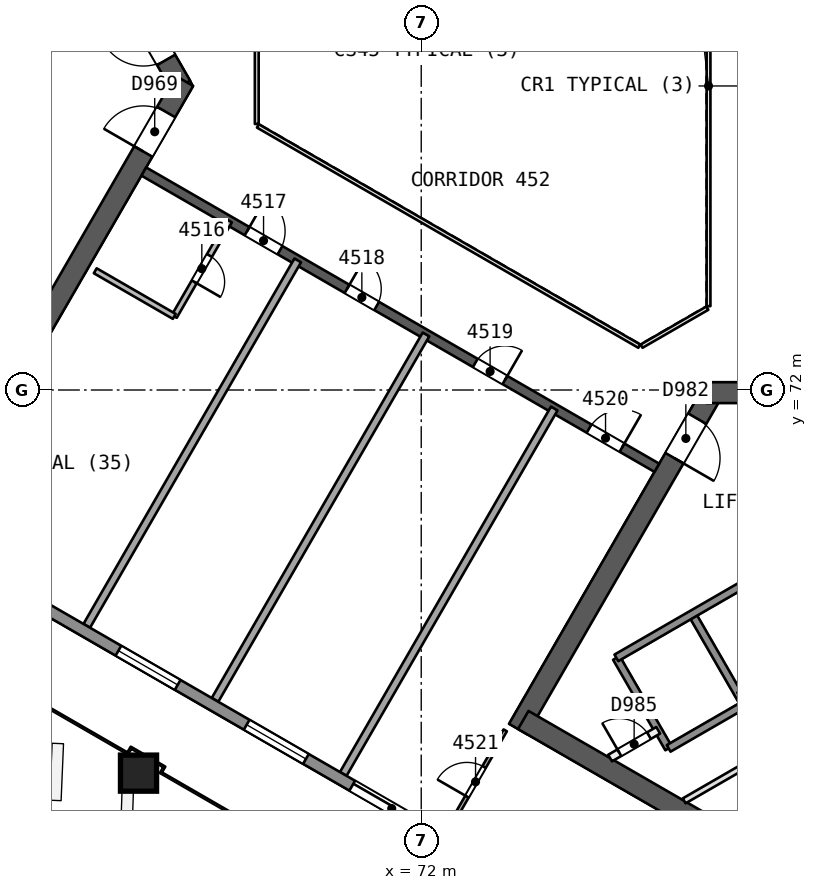
"""IFC4 building model, lengths in metres.
Left out: names, types, materials, properties, quantities, classifications, styles, units other than length and angle.
Written with IfcOpenShell. Run it as: python <this file> out.ifc"""

import sys

from ifc_helpers import new_model, si_unit, direction, frame, frame_2d, origin, origin_2d, place, context, subcontext, project, spatial, rectangle, extrude, element, fill, save


model = new_model("IFC4")
c1 = context("Model", 3, precision=1e-05, world=origin(), true_north=direction((0.0, 1.0)))
c2 = subcontext(c1, "Body", "Model", "MODEL_VIEW")
j1 = project(units=[si_unit("LENGTHUNIT", "METRE"), si_unit("PLANEANGLEUNIT", "RADIAN")], contexts=[c1])
p1 = place(None, origin())
s1 = spatial("IfcSite", under=j1, at=p1, CompositionType="ELEMENT")
p2 = place(p1, origin())
s2 = spatial("IfcBuilding", under=s1, at=p2, CompositionType="ELEMENT")
p3 = place(p2, frame((0.0, 0.0, 185.9)))
s3 = spatial("IfcBuildingStorey", under=s2, at=p3, CompositionType="ELEMENT", Elevation=185.9)
p4 = place(p3, frame((65.682, 80.0, 0.0), z_axis=(0.0, 0.0, 1.0), x_axis=(-0.500000202252, 0.866025287014, 0.0)))
e1 = element("IfcWall", 1, at=p4, inside=s3, PredefinedType="SHEAR", context=c2, shape_type="SweptSolid", body=[
    extrude(rectangle(XDim=10.221, YDim=0.55, at=frame_2d((5.111, 0.0))), origin(), (0.0, 0.0, 1.0), 3.7),
])
p5 = place(p4, frame((0.791, 0.0, 0.0)))
e2 = element("IfcOpeningElement", 2, at=p5, cuts=e1, PredefinedType="OPENING", context=c2, shape_type="SweptSolid", body=[
    extrude(rectangle(XDim=1.2, YDim=2.1, at=frame_2d((0.6, 1.05))), frame((0.0, 0.286, 0.0), z_axis=(0.0, -1.0, 0.0), x_axis=(1.0, 0.0, 0.0)), (0.0, 0.0, 1.0), 0.571),
])
p6 = place(p3, frame((60.709, 71.386, 0.0), z_axis=(0.0, 0.0, 1.0), x_axis=(0.500015938302, 0.866016201606, 0.0)))
e3 = element("IfcWall", 3, at=p6, inside=s3, PredefinedType="SHEAR", context=c2, shape_type="SweptSolid", body=[
    extrude(rectangle(XDim=10.105, YDim=0.55, at=frame_2d((5.053, 0.0))), origin(), (0.0, 0.0, 1.0), 3.7),
])
p7 = place(p6, frame((7.955, 0.0, 0.0)))
e4 = element("IfcOpeningElement", 4, at=p7, cuts=e3, PredefinedType="OPENING", context=c2, shape_type="SweptSolid", body=[
    extrude(rectangle(XDim=1.2, YDim=2.1, at=frame_2d((0.6, 1.05))), frame((0.0, 0.286, 0.0), z_axis=(0.0, -1.0, 0.0), x_axis=(1.0, 0.0, 0.0)), (0.0, 0.0, 1.0), 0.571),
])
p8 = place(p3, frame((79.659, 71.931, 0.0), z_axis=(0.0, 0.0, 1.0), x_axis=(-0.500000202252, -0.866025287014, 0.0)))
e5 = element("IfcWall", 5, at=p8, inside=s3, PredefinedType="SHEAR", context=c2, shape_type="SweptSolid", body=[
    extrude(rectangle(XDim=10.221, YDim=0.55, at=frame_2d((5.111, 0.0))), origin(), (0.0, 0.0, 1.0), 3.7),
])
p9 = place(p8, frame((0.791, 0.0, 0.0)))
e6 = element("IfcOpeningElement", 6, at=p9, cuts=e5, PredefinedType="OPENING", context=c2, shape_type="SweptSolid", body=[
    extrude(rectangle(XDim=1.2, YDim=2.1, at=frame_2d((0.6, 1.05))), frame((0.0, 0.286, 0.0), z_axis=(0.0, -1.0, 0.0), x_axis=(1.0, 0.0, 0.0)), (0.0, 0.0, 1.0), 0.571),
])
p10 = place(p3, frame((74.686, 63.317, 0.0), z_axis=(0.0, 0.0, 1.0), x_axis=(0.866024505738, -0.500001555459, 0.0)))
e7 = element("IfcWall", 7, at=p10, inside=s3, PredefinedType="SHEAR", context=c2, shape_type="SweptSolid", body=[
    extrude(rectangle(XDim=14.059, YDim=0.55, at=frame_2d((7.029, 0.0))), origin(), (0.0, 0.0, 1.0), 3.7),
])
p11 = place(p3, frame((89.605, 71.931, 0.0), z_axis=(0.0, 0.0, 1.0), x_axis=(-1.0, 0.0, 0.0)))
e8 = element("IfcWall", 8, at=p11, inside=s3, PredefinedType="SHEAR", context=c2, shape_type="SweptSolid", body=[
    extrude(rectangle(XDim=10.105, YDim=0.55, at=frame_2d((5.052, 0.0))), origin(), (0.0, 0.0, 1.0), 3.7),
])
p12 = place(p11, frame((7.955, 0.0, 0.0)))
e9 = element("IfcOpeningElement", 9, at=p12, cuts=e8, PredefinedType="OPENING", context=c2, shape_type="SweptSolid", body=[
    extrude(rectangle(XDim=1.2, YDim=2.1, at=frame_2d((0.6, 1.05))), frame((0.0, 0.286, 0.0), z_axis=(0.0, -1.0, 0.0), x_axis=(1.0, 0.0, 0.0)), (0.0, 0.0, 1.0), 0.571),
])
p13 = place(p3, frame((64.7, 77.748, 0.0), z_axis=(0.0, 0.0, 1.0), x_axis=(0.866026492143, -0.499998114903, 0.0)))
e10 = element("IfcWall", 10, at=p13, inside=s3, PredefinedType="SHEAR", context=c2, shape_type="SweptSolid", body=[
    extrude(rectangle(XDim=15.588, YDim=0.25, at=frame_2d((7.794, 0.0))), origin(), (0.0, 0.0, 1.0), 3.25),
])
p14 = place(p13, frame((3.138, 0.0, 0.0)))
e11 = element("IfcOpeningElement", 11, at=p14, cuts=e10, PredefinedType="OPENING", context=c2, shape_type="SweptSolid", body=[
    extrude(rectangle(XDim=1.0, YDim=2.1, at=frame_2d((0.5, 1.05))), frame((0.0, 0.135, 0.0), z_axis=(0.0, -1.0, 0.0), x_axis=(1.0, 0.0, 0.0)), (0.0, 0.0, 1.0), 0.271),
])
p15 = place(p13, frame((6.175, 0.0, 0.0)))
e12 = element("IfcOpeningElement", 12, at=p15, cuts=e10, PredefinedType="OPENING", context=c2, shape_type="SweptSolid", body=[
    extrude(rectangle(XDim=0.9, YDim=2.1, at=frame_2d((0.45, 1.05))), frame((0.0, 0.135, 0.0), z_axis=(0.0, -1.0, 0.0), x_axis=(1.0, 0.0, 0.0)), (0.0, 0.0, 1.0), 0.271),
])
p16 = place(p13, frame((10.072, 0.0, 0.0)))
e13 = element("IfcOpeningElement", 13, at=p16, cuts=e10, PredefinedType="OPENING", context=c2, shape_type="SweptSolid", body=[
    extrude(rectangle(XDim=0.9, YDim=2.1, at=frame_2d((0.45, 1.05))), frame((0.0, 0.135, 0.0), z_axis=(0.0, -1.0, 0.0), x_axis=(1.0, 0.0, 0.0)), (0.0, 0.0, 1.0), 0.271),
])
p17 = place(p13, frame((13.53, 0.0, 0.0)))
e14 = element("IfcOpeningElement", 14, at=p17, cuts=e10, PredefinedType="OPENING", context=c2, shape_type="SweptSolid", body=[
    extrude(rectangle(XDim=1.0, YDim=2.1, at=frame_2d((0.5, 1.05))), frame((0.0, 0.135, 0.0), z_axis=(0.0, -1.0, 0.0), x_axis=(1.0, 0.0, 0.0)), (0.0, 0.0, 1.0), 0.271),
])
p18 = place(p3, frame((64.549, 61.898, 0.0), z_axis=(0.010092954999, 0.017481261926, 0.999796248113), x_axis=(-0.866025993948, 0.499998977805, 1.48321e-07)))
e15 = element("IfcColumn", 15, at=p18, inside=s3, PredefinedType="COLUMN", context=c2, shape_type="SweptSolid", body=[
    extrude(rectangle(XDim=0.95, YDim=0.95, at=origin_2d()), origin(), (0.0, 0.0, 1.0), 3.701),
])
p19 = place(p3, frame((66.952, 76.448, 0.0), z_axis=(0.0, 0.0, 1.0), x_axis=(-0.499987231761, -0.866032775405, 0.0)))
e16 = element("IfcWall", 16, at=p19, inside=s3, PredefinedType="PARTITIONING", context=c2, shape_type="SweptSolid", body=[
    extrude(rectangle(XDim=2.9, YDim=0.15, at=frame_2d((1.45, 0.0))), origin(), (0.0, 0.0, 1.0), 3.25),
])
p20 = place(p19, frame((1.05, 0.0, 0.0)))
e17 = element("IfcOpeningElement", 17, at=p20, cuts=e16, PredefinedType="OPENING", context=c2, shape_type="SweptSolid", body=[
    extrude(rectangle(XDim=0.8, YDim=2.1, at=frame_2d((0.4, 1.05))), frame((0.0, 0.085, 0.0), z_axis=(0.0, -1.0, 0.0), x_axis=(1.0, 0.0, 0.0)), (0.0, 0.0, 1.0), 0.171),
])
p21 = place(p3, frame((65.502, 73.937, 0.0), z_axis=(0.0, 0.0, 1.0), x_axis=(-0.865994240961, 0.500053971709, 0.0)))
e18 = element("IfcWall", 18, at=p21, inside=s3, PredefinedType="PARTITIONING", context=c2, shape_type="SweptSolid", body=[
    extrude(rectangle(XDim=2.401, YDim=0.15, at=frame_2d((1.201, 0.0))), origin(), (0.0, 0.0, 1.0), 3.25),
])
for number, where, z_axis, x_axis in (
    (19, (63.198, 65.794, 0.0), (0.0, 0.0, 1.0), (0.5, 0.866, 0.0)),
    (20, (66.573, 63.845, 0.0), (0.0, 0.0, 1.0), (0.5, 0.866, 0.0)),
    (21, (69.948, 61.897, 0.0), (0.0, 0.0, 1.0), (0.5, 0.866, 0.0)),
):
    element("IfcWall", number, at=place(p3, frame(where, z_axis=z_axis, x_axis=x_axis)), inside=s3, PredefinedType="PARTITIONING", context=c2, shape_type="SweptSolid", body=[
        extrude(rectangle(XDim=11.104, YDim=0.2, at=frame_2d((5.552, 0.0))), origin(), (0.0, 0.0, 1.0), 3.25),
    ])
p22 = place(p3, frame((72.648, 60.338, 0.0), z_axis=(0.0, 0.0, 1.0), x_axis=(0.4999794672, 0.866037258078, 0.0)))
e22 = element("IfcWall", 22, at=p22, inside=s3, PredefinedType="PARTITIONING", context=c2, shape_type="SweptSolid", body=[
    extrude(rectangle(XDim=3.125, YDim=0.1, at=frame_2d((1.562, 0.0))), origin(), (0.0, 0.0, 1.0), 3.25),
])
p23 = place(p22, frame((1.112, 0.0, 0.0)))
e23 = element("IfcOpeningElement", 23, at=p23, cuts=e22, PredefinedType="OPENING", context=c2, shape_type="SweptSolid", body=[
    extrude(rectangle(XDim=0.9, YDim=2.1, at=frame_2d((0.45, 1.05))), frame((0.0, 0.061, 0.0), z_axis=(0.0, -1.0, 0.0), x_axis=(1.0, 0.0, 0.0)), (0.0, 0.0, 1.0), 0.121),
])
p24 = place(p3, frame((88.677, 50.912, 0.0), z_axis=(0.0, 0.0, 1.0), x_axis=(-0.866024890781, 0.500000888547, 0.0)))
e24 = element("IfcWall", 24, at=p24, inside=s3, PredefinedType="SOLIDWALL", context=c2, shape_type="SweptSolid", body=[
    extrude(rectangle(XDim=52.776, YDim=0.3, at=frame_2d((26.388, 0.0))), origin(), (0.0, 0.0, 1.0), 3.25),
])
p25 = place(p24, frame((18.953, 0.0, 0.0)))
e25 = element("IfcOpeningElement", 25, at=p25, cuts=e24, PredefinedType="OPENING", context=c2, shape_type="SweptSolid", body=[
    extrude(rectangle(XDim=2.4, YDim=2.4, at=frame_2d((1.2, 1.2))), frame((0.0, 0.161, 0.0), z_axis=(0.0, -1.0, 0.0), x_axis=(1.0, 0.0, 0.0)), (0.0, 0.0, 1.0), 0.321),
])
p26 = place(p24, frame((9.385, 0.0, 0.0)))
e26 = element("IfcOpeningElement", 26, at=p26, cuts=e24, PredefinedType="OPENING", context=c2, shape_type="SweptSolid", body=[
    extrude(rectangle(XDim=2.4, YDim=2.4, at=frame_2d((1.2, 1.2))), frame((0.0, 0.161, 0.0), z_axis=(0.0, -1.0, 0.0), x_axis=(1.0, 0.0, 0.0)), (0.0, 0.0, 1.0), 0.321),
])
p27 = place(p24, frame((39.984, 0.0, 0.0)))
e27 = element("IfcOpeningElement", 27, at=p27, cuts=e24, PredefinedType="OPENING", context=c2, shape_type="SweptSolid", body=[
    extrude(rectangle(XDim=2.4, YDim=2.4, at=frame_2d((1.2, 1.2))), frame((0.0, 0.161, 0.0), z_axis=(0.0, -1.0, 0.0), x_axis=(1.0, 0.0, 0.0)), (0.0, 0.0, 1.0), 0.321),
])
p28 = place(p24, frame((26.657, 0.0, 0.9)))
e28 = element("IfcOpeningElement", 28, at=p28, cuts=e24, PredefinedType="OPENING", context=c2, shape_type="SweptSolid", body=[
    extrude(rectangle(XDim=1.8, YDim=1.5, at=frame_2d((0.9, 0.75))), frame((0.0, 0.161, 0.0), z_axis=(0.0, -1.0, 0.0), x_axis=(1.0, 0.0, 0.0)), (0.0, 0.0, 1.0), 0.321),
])
p29 = place(p24, frame((22.76, 0.0, 0.9)))
e29 = element("IfcOpeningElement", 29, at=p29, cuts=e24, PredefinedType="OPENING", context=c2, shape_type="SweptSolid", body=[
    extrude(rectangle(XDim=1.8, YDim=1.5, at=frame_2d((0.9, 0.75))), frame((0.0, 0.161, 0.0), z_axis=(0.0, -1.0, 0.0), x_axis=(1.0, 0.0, 0.0)), (0.0, 0.0, 1.0), 0.321),
])
for number, where, z_axis, x_axis in (
    (30, (77.135, 64.952, 0.0), (0.0, 0.0, 1.0), (0.5, -0.866, 0.0)),
    (31, (79.127, 66.102, 0.0), (0.0, 0.0, 1.0), (0.5, -0.866, 0.0)),
):
    element("IfcWall", number, at=place(p3, frame(where, z_axis=z_axis, x_axis=x_axis)), inside=s3, PredefinedType="SOLIDWALL", context=c2, shape_type="SweptSolid", body=[
        extrude(rectangle(XDim=2.75, YDim=0.2, at=frame_2d((1.375, 0.0))), origin(), (0.0, 0.0, 1.0), 3.25),
    ])
p30 = place(p3, frame((77.135, 64.952, 0.0), z_axis=(0.0, 0.0, 1.0), x_axis=(0.866031916153, 0.499988720078, 0.0)))
e32 = element("IfcWall", 32, at=p30, inside=s3, PredefinedType="SOLIDWALL", context=c2, shape_type="SweptSolid", body=[
    extrude(rectangle(XDim=11.35, YDim=0.2, at=frame_2d((5.675, 0.0))), origin(), (0.0, 0.0, 1.0), 3.25),
])
p31 = place(p3, frame((76.97, 62.316, 0.0), z_axis=(0.0, 0.0, 1.0), x_axis=(0.865982457891, 0.500074377092, 0.0)))
e33 = element("IfcWall", 33, at=p31, inside=s3, PredefinedType="PARTITIONING", context=c2, shape_type="SweptSolid", body=[
    extrude(rectangle(XDim=1.461, YDim=0.2, at=frame_2d((0.73, 0.0))), origin(), (0.0, 0.0, 1.0), 3.25),
])
p32 = place(p31, frame((0.281, 0.0, 0.0)))
e34 = element("IfcOpeningElement", 34, at=p32, cuts=e33, PredefinedType="OPENING", context=c2, shape_type="SweptSolid", body=[
    extrude(rectangle(XDim=0.9, YDim=2.1, at=frame_2d((0.45, 1.05))), frame((0.0, 0.11, 0.0), z_axis=(0.0, -1.0, 0.0), x_axis=(1.0, 0.0, 0.0)), (0.0, 0.0, 1.0), 0.221),
])
p33 = place(p3, frame((80.367, 63.954, 0.0), z_axis=(0.0, 0.0, 1.0), x_axis=(0.866026575979, 0.499997969693, 0.0)))
e35 = element("IfcWall", 35, at=p33, inside=s3, PredefinedType="SOLIDWALL", context=c2, shape_type="SweptSolid", body=[
    extrude(rectangle(XDim=6.75, YDim=0.2, at=frame_2d((3.375, 0.0))), origin(), (0.0, 0.0, 1.0), 3.25),
])
p34 = place(p3, frame((78.51, 62.57, 0.0), z_axis=(0.0, 0.0, 1.0), x_axis=(0.866053019151, 0.499952165731, 0.0)))
e36 = element("IfcWall", 36, at=p34, inside=s3, PredefinedType="SOLIDWALL", context=c2, shape_type="SweptSolid", body=[
    extrude(rectangle(XDim=2.3, YDim=0.2, at=frame_2d((1.15, 0.0))), origin(), (0.0, 0.0, 1.0), 3.25),
])
p35 = place(p3, frame((78.92, 61.19, 0.0), z_axis=(0.0, 0.0, 1.0), x_axis=(0.866038211682, 0.499977815414, 0.0)))
e37 = element("IfcWall", 37, at=p35, inside=s3, PredefinedType="PARTITIONING", context=c2, shape_type="SweptSolid", body=[
    extrude(rectangle(XDim=2.51, YDim=0.15, at=frame_2d((1.255, 0.0))), origin(), (0.0, 0.0, 1.0), 3.25),
])
p36 = place(p3, frame((79.56, 74.206, 0.0), z_axis=(0.0, 0.0, 1.0), x_axis=(0.0, 1.0, 0.0)))
e38 = element("IfcWall", 38, at=p36, inside=s3, PredefinedType="PARTITIONING", context=c2, shape_type="SweptSolid", body=[
    extrude(rectangle(XDim=11.588, YDim=0.1, at=frame_2d((5.794, 0.0))), origin(), (0.0, 0.0, 1.0), 3.25),
])
p37 = place(p3, frame((67.672, 81.0, 0.0), z_axis=(0.0, 0.0, 1.0), x_axis=(0.0, -1.0, 0.0)))
e39 = element("IfcWall", 39, at=p37, inside=s3, PredefinedType="PARTITIONING", context=c2, shape_type="SweptSolid", body=[
    extrude(rectangle(XDim=2.0, YDim=0.1, at=frame_2d((1.0, 0.0))), origin(), (0.0, 0.0, 1.0), 3.25),
])
p38 = place(p3, frame((67.702, 78.948, 0.0), z_axis=(0.0, 0.0, 1.0), x_axis=(0.866026658274, -0.499997827154, 0.0)))
e40 = element("IfcWall", 40, at=p38, inside=s3, PredefinedType="PARTITIONING", context=c2, shape_type="SweptSolid", body=[
    extrude(rectangle(XDim=11.588, YDim=0.1, at=frame_2d((5.794, 0.0))), origin(), (0.0, 0.0, 1.0), 3.25),
])
p39 = place(p3, frame((77.798, 73.154, 0.0), z_axis=(0.0, 0.0, 1.0), x_axis=(0.866041268327, 0.499972520799, 0.0)))
e41 = element("IfcWall", 41, at=p39, inside=s3, PredefinedType="PARTITIONING", context=c2, shape_type="SweptSolid", body=[
    extrude(rectangle(XDim=2.0, YDim=0.1, at=frame_2d((1.0, 0.0))), origin(), (0.0, 0.0, 1.0), 3.25),
])
p40 = place(p20, origin())
e42 = element("IfcDoor", 42, at=p40, inside=s3, OperationType="SINGLE_SWING_RIGHT", PredefinedType="NOTDEFINED", context=c2, shape_type="SweptSolid", body=[
    extrude(rectangle(XDim=0.8, YDim=2.1, at=frame_2d((0.4, 1.05))), frame((0.0, 0.025, 0.0), z_axis=(0.0, -1.0, 0.0), x_axis=(1.0, 0.0, 0.0)), (0.0, 0.0, 1.0), 0.05),
])
fill(e17, e42)
p41 = place(p14, origin())
e43 = element("IfcDoor", 43, at=p41, inside=s3, OperationType="SINGLE_SWING_LEFT", PredefinedType="NOTDEFINED", context=c2, shape_type="SweptSolid", body=[
    extrude(rectangle(XDim=1.0, YDim=2.1, at=frame_2d((0.5, 1.05))), frame((0.0, 0.025, 0.0), z_axis=(0.0, -1.0, 0.0), x_axis=(1.0, 0.0, 0.0)), (0.0, 0.0, 1.0), 0.05),
])
fill(e11, e43)
p42 = place(p15, origin())
e44 = element("IfcDoor", 44, at=p42, inside=s3, OperationType="SINGLE_SWING_LEFT", PredefinedType="NOTDEFINED", context=c2, shape_type="SweptSolid", body=[
    extrude(rectangle(XDim=0.9, YDim=2.1, at=frame_2d((0.45, 1.05))), frame((0.0, 0.025, 0.0), z_axis=(0.0, -1.0, 0.0), x_axis=(1.0, 0.0, 0.0)), (0.0, 0.0, 1.0), 0.05),
])
fill(e12, e44)
p43 = place(p16, origin())
e45 = element("IfcDoor", 45, at=p43, inside=s3, OperationType="SINGLE_SWING_RIGHT", PredefinedType="NOTDEFINED", context=c2, shape_type="SweptSolid", body=[
    extrude(rectangle(XDim=0.9, YDim=2.1, at=frame_2d((0.45, 1.05))), frame((0.0, 0.025, 0.0), z_axis=(0.0, -1.0, 0.0), x_axis=(1.0, 0.0, 0.0)), (0.0, 0.0, 1.0), 0.05),
])
fill(e13, e45)
p44 = place(p17, origin())
e46 = element("IfcDoor", 46, at=p44, inside=s3, OperationType="SINGLE_SWING_RIGHT", PredefinedType="NOTDEFINED", context=c2, shape_type="SweptSolid", body=[
    extrude(rectangle(XDim=1.0, YDim=2.1, at=frame_2d((0.5, 1.05))), frame((0.0, 0.025, 0.0), z_axis=(0.0, -1.0, 0.0), x_axis=(1.0, 0.0, 0.0)), (0.0, 0.0, 1.0), 0.05),
])
fill(e14, e46)
p45 = place(p23, origin())
e47 = element("IfcDoor", 47, at=p45, inside=s3, OperationType="SINGLE_SWING_LEFT", PredefinedType="NOTDEFINED", context=c2, shape_type="SweptSolid", body=[
    extrude(rectangle(XDim=0.9, YDim=2.1, at=frame_2d((0.45, 1.05))), frame((0.0, 0.025, 0.0), z_axis=(0.0, -1.0, 0.0), x_axis=(1.0, 0.0, 0.0)), (0.0, 0.0, 1.0), 0.05),
])
fill(e23, e47)
p46 = place(p25, origin())
e48 = element("IfcDoor", 48, at=p46, inside=s3, OperationType="SLIDING_TO_LEFT", PredefinedType="NOTDEFINED", context=c2, shape_type="SweptSolid", body=[
    extrude(rectangle(XDim=2.4, YDim=2.4, at=frame_2d((1.2, 1.2))), frame((0.0, 0.025, 0.0), z_axis=(0.0, -1.0, 0.0), x_axis=(1.0, 0.0, 0.0)), (0.0, 0.0, 1.0), 0.05),
])
fill(e25, e48)
p47 = place(p28, origin())
e49 = element("IfcWindow", 49, at=p47, inside=s3, PartitioningType="SINGLE_PANEL", PredefinedType="WINDOW", context=c2, shape_type="SweptSolid", body=[
    extrude(rectangle(XDim=1.8, YDim=1.5, at=frame_2d((0.9, 0.75))), frame((0.0, 0.03, 0.0), z_axis=(0.0, -1.0, 0.0), x_axis=(1.0, 0.0, 0.0)), (0.0, 0.0, 1.0), 0.06),
])
fill(e28, e49)
p48 = place(p29, origin())
e50 = element("IfcWindow", 50, at=p48, inside=s3, PartitioningType="SINGLE_PANEL", PredefinedType="WINDOW", context=c2, shape_type="SweptSolid", body=[
    extrude(rectangle(XDim=1.8, YDim=1.5, at=frame_2d((0.9, 0.75))), frame((0.0, 0.03, 0.0), z_axis=(0.0, -1.0, 0.0), x_axis=(1.0, 0.0, 0.0)), (0.0, 0.0, 1.0), 0.06),
])
fill(e29, e50)
p49 = place(p5, origin())
e51 = element("IfcDoor", 51, at=p49, inside=s3, OperationType="SINGLE_SWING_RIGHT", PredefinedType="NOTDEFINED", context=c2, shape_type="SweptSolid", body=[
    extrude(rectangle(XDim=1.2, YDim=2.1, at=frame_2d((0.6, 1.05))), frame((0.0, 0.025, 0.0), z_axis=(0.0, -1.0, 0.0), x_axis=(1.0, 0.0, 0.0)), (0.0, 0.0, 1.0), 0.05),
])
fill(e2, e51)
p50 = place(p7, origin())
e52 = element("IfcDoor", 52, at=p50, inside=s3, OperationType="SINGLE_SWING_LEFT", PredefinedType="NOTDEFINED", context=c2, shape_type="SweptSolid", body=[
    extrude(rectangle(XDim=1.2, YDim=2.1, at=frame_2d((0.6, 1.05))), frame((0.0, 0.025, 0.0), z_axis=(0.0, -1.0, 0.0), x_axis=(1.0, 0.0, 0.0)), (0.0, 0.0, 1.0), 0.05),
])
fill(e4, e52)
p51 = place(p9, origin())
e53 = element("IfcDoor", 53, at=p51, inside=s3, OperationType="SINGLE_SWING_RIGHT", PredefinedType="NOTDEFINED", context=c2, shape_type="SweptSolid", body=[
    extrude(rectangle(XDim=1.2, YDim=2.1, at=frame_2d((0.6, 1.05))), frame((0.0, 0.025, 0.0), z_axis=(0.0, -1.0, 0.0), x_axis=(1.0, 0.0, 0.0)), (0.0, 0.0, 1.0), 0.05),
])
fill(e6, e53)
p52 = place(p32, origin())
e54 = element("IfcDoor", 54, at=p52, inside=s3, OperationType="SINGLE_SWING_LEFT", PredefinedType="NOTDEFINED", context=c2, shape_type="SweptSolid", body=[
    extrude(rectangle(XDim=0.9, YDim=2.1, at=frame_2d((0.45, 1.05))), frame((0.0, 0.025, 0.0), z_axis=(0.0, -1.0, 0.0), x_axis=(1.0, 0.0, 0.0)), (0.0, 0.0, 1.0), 0.05),
])
fill(e34, e54)
save(model, sys.argv[1])
